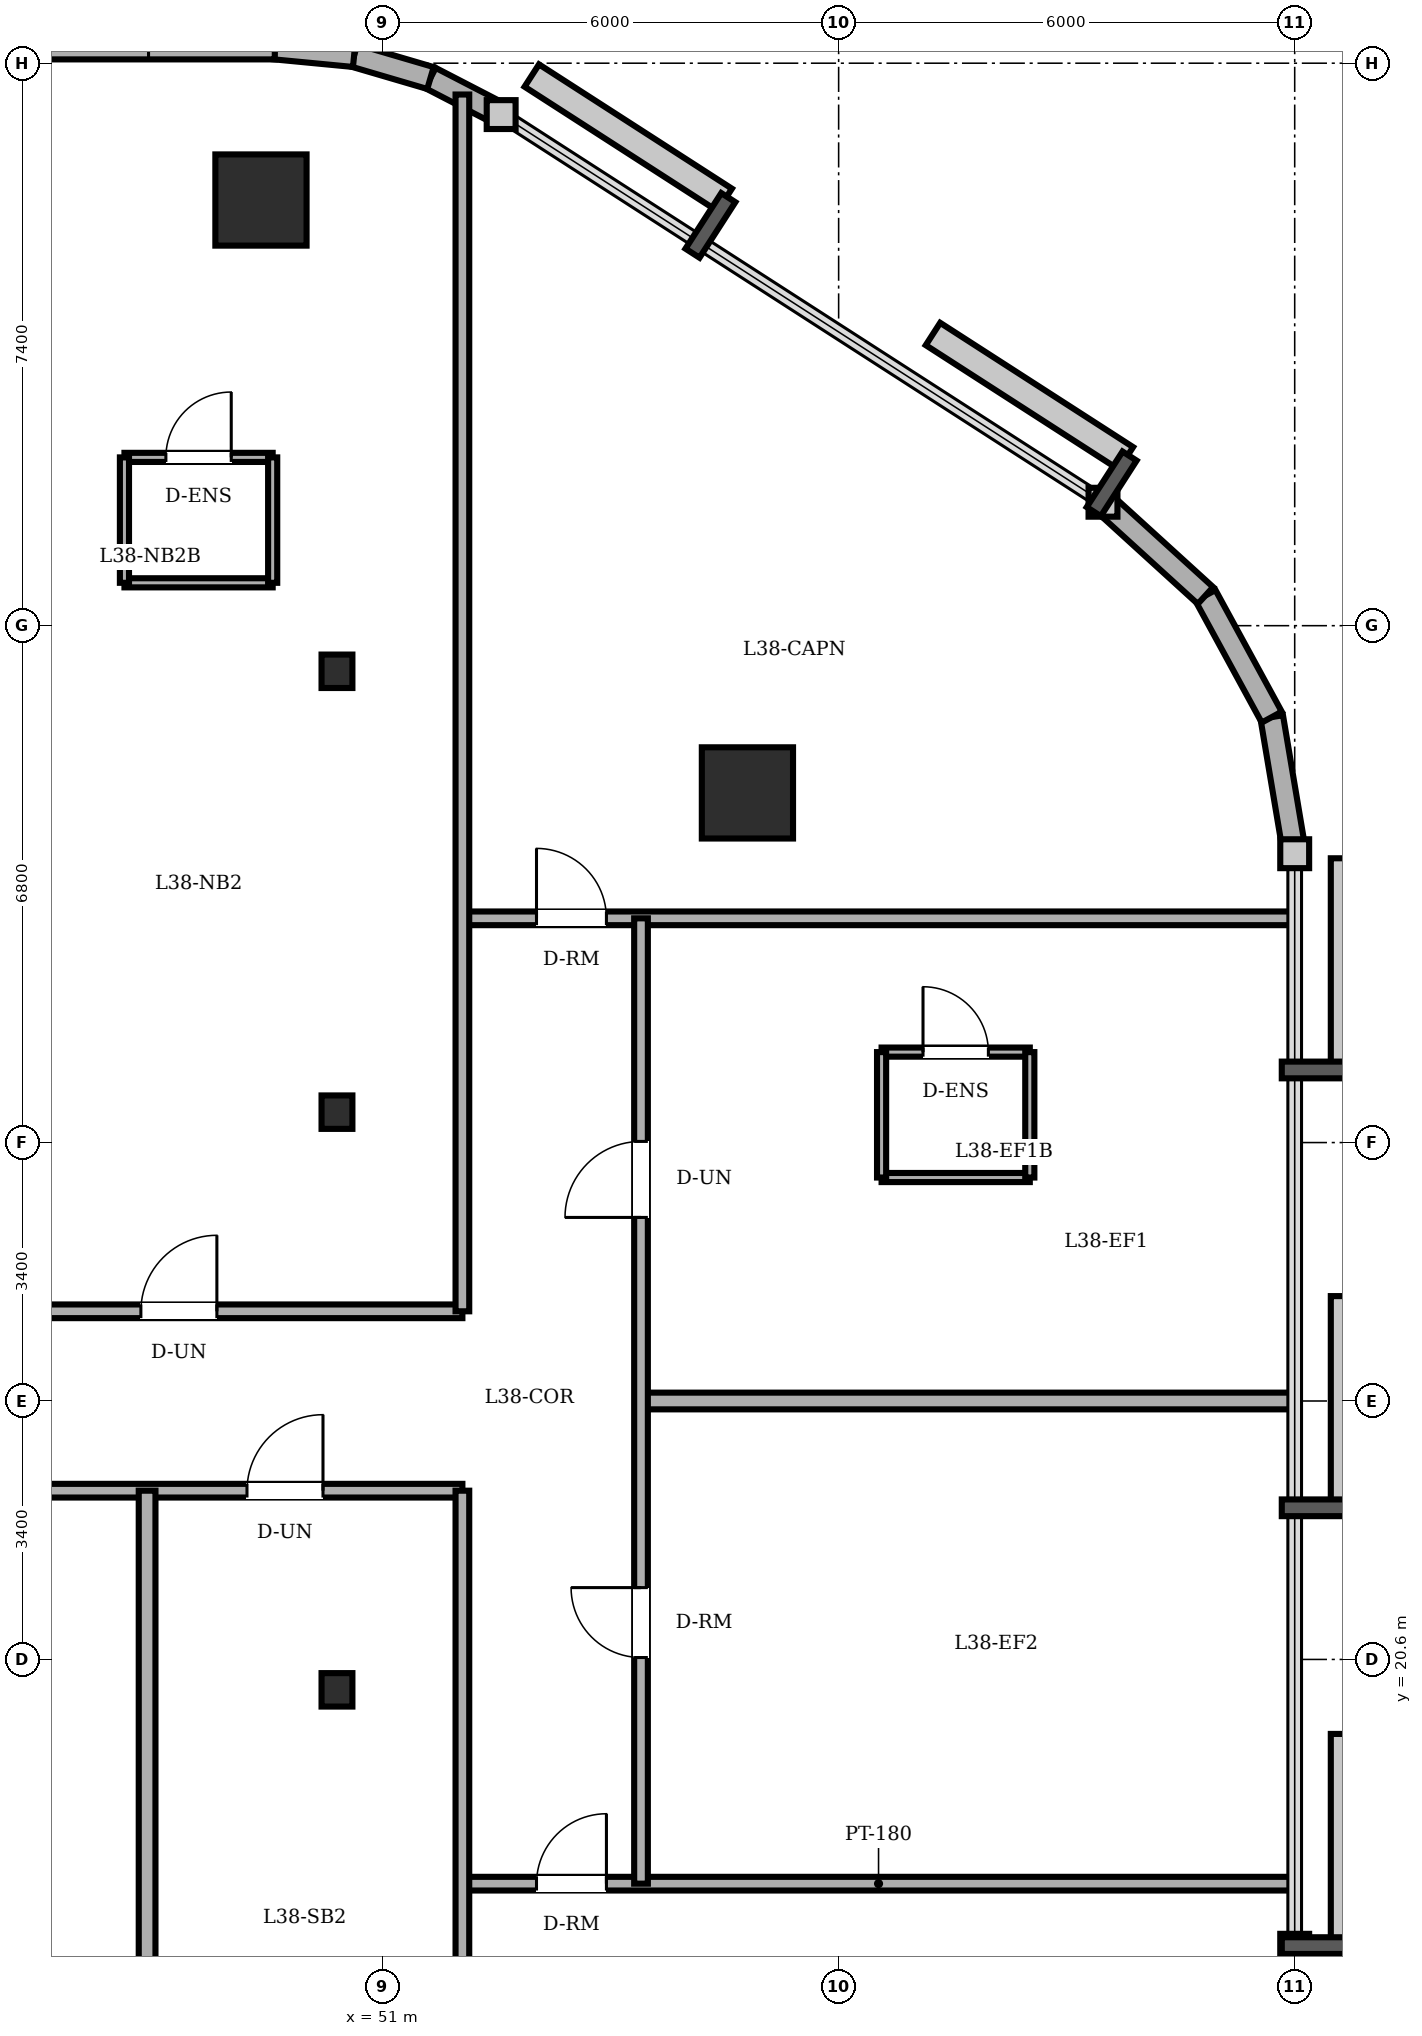
"""IFC4 building model, lengths in metres.
Left out: names, types, materials, properties, quantities, classifications, styles, units other than length and angle.
Written with IfcOpenShell. Run it as: python <this file> out.ifc"""

import sys

from ifc_helpers import new_model, si_unit, direction, frame, frame_2d, origin, origin_2d, place, context, subcontext, project, spatial, rectangle, circle, i_section, extrude, element, fill, save


model = new_model("IFC4")
c1 = context("Model", 3, precision=1e-05, world=origin(), true_north=direction((0.0, 1.0)))
c2 = subcontext(c1, "Body", "Model", "MODEL_VIEW")
j1 = project(units=[si_unit("LENGTHUNIT", "METRE"), si_unit("PLANEANGLEUNIT", "RADIAN")], contexts=[c1])
p1 = place(None, origin())
s1 = spatial("IfcSite", under=j1, at=p1, CompositionType="ELEMENT")
p2 = place(p1, origin())
s2 = spatial("IfcBuilding", under=s1, at=p2, CompositionType="ELEMENT")
p3 = place(p2, frame((0.0, 0.0, 147.4)))
s3 = spatial("IfcBuildingStorey", under=s2, at=p3, CompositionType="ELEMENT", Elevation=147.4)
for number, where, z_axis, x_axis in (
    (1, (55.8, 32.0, 0.0), (0.0, 0.0, 1.0), (1.0, 0.0, 0.0)),
    (2, (49.4, 39.8, 0.0), (0.0, 0.0, 1.0), (1.0, 0.0, 0.0)),
):
    element("IfcColumn", number, at=place(p3, frame(where, z_axis=z_axis, x_axis=x_axis)), inside=s3, PredefinedType="COLUMN", context=c2, shape_type="SweptSolid", body=[
        extrude(circle(Radius=0.6, at=origin_2d()), origin(), (0.0, 0.0, 1.0), 3.6),
    ])
for number, where, z_axis, x_axis in (
    (3, (50.4, 20.2, 0.0), (0.0, 0.0, 1.0), (1.0, 0.0, 0.0)),
    (4, (50.4, 27.8, 0.0), (0.0, 0.0, 1.0), (1.0, 0.0, 0.0)),
    (5, (50.4, 33.6, 0.0), (0.0, 0.0, 1.0), (1.0, 0.0, 0.0)),
):
    element("IfcColumn", number, at=place(p3, frame(where, z_axis=z_axis, x_axis=x_axis)), inside=s3, PredefinedType="COLUMN", context=c2, shape_type="SweptSolid", body=[
        extrude(i_section(OverallWidth=0.406, OverallDepth=0.44, WebThickness=0.024, FlangeThickness=0.039, FilletRadius=0.015, at=origin_2d()), origin(), (0.0, 0.0, 1.0), 3.6),
    ])
for number, where, z_axis, x_axis in (
    (6, (62.698, 15.003, 0.0), (0.0, 0.0, 1.0), (0.166, 0.986, 0.0)),
    (7, (63.0, 31.2, 0.0), (0.0, 0.0, 1.0), (-0.166, 0.986, 0.0)),
):
    element("IfcWall", number, at=place(p3, frame(where, z_axis=z_axis, x_axis=x_axis)), inside=s3, PredefinedType="SOLIDWALL", context=c2, shape_type="SweptSolid", body=[
        extrude(rectangle(XDim=1.822, YDim=0.3, at=frame_2d((0.911, 0.0))), origin(), (0.0, 0.0, 1.0), 3.4),
    ])
p4 = place(p3, frame((62.698, 32.997, 0.0), z_axis=(0.0, 0.0, 1.0), x_axis=(-0.478608030646, 0.878028674362, 0.0)))
e8 = element("IfcWall", 8, at=p4, inside=s3, PredefinedType="SOLIDWALL", context=c2, shape_type="SweptSolid", body=[
    extrude(rectangle(XDim=1.822, YDim=0.3, at=frame_2d((0.911, 0.0))), origin(), (0.0, 0.0, 1.0), 3.4),
])
p5 = place(p3, frame((61.826, 34.597, 0.0), z_axis=(0.0, 0.0, 1.0), x_axis=(-0.73947929393, 0.673179302897, 0.0)))
e9 = element("IfcWall", 9, at=p5, inside=s3, PredefinedType="SOLIDWALL", context=c2, shape_type="SweptSolid", body=[
    extrude(rectangle(XDim=1.823, YDim=0.3, at=frame_2d((0.911, 0.0))), origin(), (0.0, 0.0, 1.0), 3.4),
])
p6 = place(p3, frame((52.56, 40.924, 0.0), z_axis=(0.0, 0.0, 1.0), x_axis=(-0.888283247196, 0.459296062198, 0.0)))
e10 = element("IfcWall", 10, at=p6, inside=s3, PredefinedType="SOLIDWALL", context=c2, shape_type="SweptSolid", body=[
    extrude(rectangle(XDim=1.047, YDim=0.3, at=frame_2d((0.523, 0.0))), origin(), (0.0, 0.0, 1.0), 3.4),
])
p7 = place(p3, frame((51.63, 41.405, 0.0), z_axis=(0.0, 0.0, 1.0), x_axis=(-0.959528674476, 0.281610942363, 0.0)))
e11 = element("IfcWall", 11, at=p7, inside=s3, PredefinedType="SOLIDWALL", context=c2, shape_type="SweptSolid", body=[
    extrude(rectangle(XDim=1.047, YDim=0.3, at=frame_2d((0.524, 0.0))), origin(), (0.0, 0.0, 1.0), 3.4),
])
p8 = place(p3, frame((50.625, 41.7, 0.0), z_axis=(0.0, 0.0, 1.0), x_axis=(-0.995426089968, 0.095534807324, 0.0)))
e12 = element("IfcWall", 12, at=p8, inside=s3, PredefinedType="SOLIDWALL", context=c2, shape_type="SweptSolid", body=[
    extrude(rectangle(XDim=1.048, YDim=0.3, at=frame_2d((0.524, 0.0))), origin(), (0.0, 0.0, 1.0), 3.4),
])
p9 = place(p3, frame((49.582, 41.8, 0.0), z_axis=(0.0, 0.0, 1.0), x_axis=(-1.0, 0.0, 0.0)))
e13 = element("IfcWall", 13, at=p9, inside=s3, PredefinedType="SOLIDWALL", context=c2, shape_type="SweptSolid", body=[
    extrude(rectangle(XDim=30.282, YDim=0.3, at=frame_2d((15.141, 0.0))), origin(), (0.0, 0.0, 1.0), 3.4),
])
p10 = place(p9, frame((25.707, 0.0, 0.0)))
e14 = element("IfcOpeningElement", 14, at=p10, cuts=e13, PredefinedType="OPENING", context=c2, shape_type="SweptSolid", body=[
    extrude(rectangle(XDim=0.95, YDim=2.2, at=frame_2d((0.475, 1.1))), frame((0.0, 0.16, 0.0), z_axis=(0.0, -1.0, 0.0), x_axis=(1.0, 0.0, 0.0)), (0.0, 0.0, 1.0), 0.32),
])
p11 = place(p9, frame((1.661, 0.0, 0.85)))
e15 = element("IfcOpeningElement", 15, at=p11, cuts=e13, PredefinedType="OPENING", context=c2, shape_type="SweptSolid", body=[
    extrude(rectangle(XDim=1.5, YDim=1.55, at=frame_2d((0.75, 0.775))), frame((0.0, 0.16, 0.0), z_axis=(0.0, -1.0, 0.0), x_axis=(1.0, 0.0, 0.0)), (0.0, 0.0, 1.0), 0.32),
])
p12 = place(p9, frame((5.476, 0.0, 0.85)))
e16 = element("IfcOpeningElement", 16, at=p12, cuts=e13, PredefinedType="OPENING", context=c2, shape_type="SweptSolid", body=[
    extrude(rectangle(XDim=1.5, YDim=1.55, at=frame_2d((0.75, 0.775))), frame((0.0, 0.16, 0.0), z_axis=(0.0, -1.0, 0.0), x_axis=(1.0, 0.0, 0.0)), (0.0, 0.0, 1.0), 0.32),
])
p13 = place(p9, frame((7.229, 0.0, 0.85)))
e17 = element("IfcOpeningElement", 17, at=p13, cuts=e13, PredefinedType="OPENING", context=c2, shape_type="SweptSolid", body=[
    extrude(rectangle(XDim=1.5, YDim=1.55, at=frame_2d((0.75, 0.775))), frame((0.0, 0.16, 0.0), z_axis=(0.0, -1.0, 0.0), x_axis=(1.0, 0.0, 0.0)), (0.0, 0.0, 1.0), 0.32),
])
p14 = place(p9, frame((11.665, 0.0, 0.85)))
e18 = element("IfcOpeningElement", 18, at=p14, cuts=e13, PredefinedType="OPENING", context=c2, shape_type="SweptSolid", body=[
    extrude(rectangle(XDim=1.5, YDim=1.55, at=frame_2d((0.75, 0.775))), frame((0.0, 0.16, 0.0), z_axis=(0.0, -1.0, 0.0), x_axis=(1.0, 0.0, 0.0)), (0.0, 0.0, 1.0), 0.32),
])
p15 = place(p9, frame((14.349, 0.0, 0.85)))
e19 = element("IfcOpeningElement", 19, at=p15, cuts=e13, PredefinedType="OPENING", context=c2, shape_type="SweptSolid", body=[
    extrude(rectangle(XDim=1.5, YDim=1.55, at=frame_2d((0.75, 0.775))), frame((0.0, 0.16, 0.0), z_axis=(0.0, -1.0, 0.0), x_axis=(1.0, 0.0, 0.0)), (0.0, 0.0, 1.0), 0.32),
])
p16 = place(p9, frame((18.932, 0.0, 0.85)))
e20 = element("IfcOpeningElement", 20, at=p16, cuts=e13, PredefinedType="OPENING", context=c2, shape_type="SweptSolid", body=[
    extrude(rectangle(XDim=1.5, YDim=1.55, at=frame_2d((0.75, 0.775))), frame((0.0, 0.16, 0.0), z_axis=(0.0, -1.0, 0.0), x_axis=(1.0, 0.0, 0.0)), (0.0, 0.0, 1.0), 0.32),
])
p17 = place(p9, frame((22.532, 0.0, 0.85)))
e21 = element("IfcOpeningElement", 21, at=p17, cuts=e13, PredefinedType="OPENING", context=c2, shape_type="SweptSolid", body=[
    extrude(rectangle(XDim=1.5, YDim=1.55, at=frame_2d((0.75, 0.775))), frame((0.0, 0.16, 0.0), z_axis=(0.0, -1.0, 0.0), x_axis=(1.0, 0.0, 0.0)), (0.0, 0.0, 1.0), 0.32),
])
p18 = place(p9, frame((27.532, 0.0, 0.85)))
e22 = element("IfcOpeningElement", 22, at=p18, cuts=e13, PredefinedType="OPENING", context=c2, shape_type="SweptSolid", body=[
    extrude(rectangle(XDim=1.5, YDim=1.55, at=frame_2d((0.75, 0.775))), frame((0.0, 0.16, 0.0), z_axis=(0.0, -1.0, 0.0), x_axis=(1.0, 0.0, 0.0)), (0.0, 0.0, 1.0), 0.32),
])
p19 = place(p3, frame((47.604, 36.414, 0.0), z_axis=(0.0, 0.0, 1.0), x_axis=(1.0, 0.0, 0.0)))
e23 = element("IfcWall", 23, at=p19, inside=s3, PredefinedType="PARTITIONING", context=c2, shape_type="SweptSolid", body=[
    extrude(rectangle(XDim=1.95, YDim=0.12, at=frame_2d((0.975, 0.0))), origin(), (0.0, 0.0, 1.0), 3.4),
])
p20 = place(p19, frame((0.545, 0.0, 0.0)))
e24 = element("IfcOpeningElement", 24, at=p20, cuts=e23, PredefinedType="OPENING", context=c2, shape_type="SweptSolid", body=[
    extrude(rectangle(XDim=0.86, YDim=2.1, at=frame_2d((0.43, 1.05))), frame((0.0, 0.07, 0.0), z_axis=(0.0, -1.0, 0.0), x_axis=(1.0, 0.0, 0.0)), (0.0, 0.0, 1.0), 0.14),
])
p21 = place(p3, frame((49.554, 34.764, 0.0), z_axis=(0.0, 0.0, 1.0), x_axis=(-1.0, 0.0, 0.0)))
e25 = element("IfcWall", 25, at=p21, inside=s3, PredefinedType="PARTITIONING", context=c2, shape_type="SweptSolid", body=[
    extrude(rectangle(XDim=1.95, YDim=0.12, at=frame_2d((0.975, 0.0))), origin(), (0.0, 0.0, 1.0), 3.4),
])
for number, where, z_axis, x_axis in (
    (26, (47.604, 36.414, 0.0), (0.0, 0.0, 1.0), (0.0, -1.0, 0.0)),
    (27, (49.554, 34.764, 0.0), (0.0, 0.0, 1.0), (0.0, 1.0, 0.0)),
):
    element("IfcWall", number, at=place(p3, frame(where, z_axis=z_axis, x_axis=x_axis)), inside=s3, PredefinedType="PARTITIONING", context=c2, shape_type="SweptSolid", body=[
        extrude(rectangle(XDim=1.65, YDim=0.12, at=frame_2d((0.825, 0.0))), origin(), (0.0, 0.0, 1.0), 3.4),
    ])
p22 = place(p3, frame((57.565, 28.59, 0.0), z_axis=(0.0, 0.0, 1.0), x_axis=(1.0, 0.0, 0.0)))
e28 = element("IfcWall", 28, at=p22, inside=s3, PredefinedType="PARTITIONING", context=c2, shape_type="SweptSolid", body=[
    extrude(rectangle(XDim=1.95, YDim=0.12, at=frame_2d((0.975, 0.0))), origin(), (0.0, 0.0, 1.0), 3.4),
])
p23 = place(p22, frame((0.545, 0.0, 0.0)))
e29 = element("IfcOpeningElement", 29, at=p23, cuts=e28, PredefinedType="OPENING", context=c2, shape_type="SweptSolid", body=[
    extrude(rectangle(XDim=0.86, YDim=2.1, at=frame_2d((0.43, 1.05))), frame((0.0, 0.07, 0.0), z_axis=(0.0, -1.0, 0.0), x_axis=(1.0, 0.0, 0.0)), (0.0, 0.0, 1.0), 0.14),
])
p24 = place(p3, frame((59.515, 26.94, 0.0), z_axis=(0.0, 0.0, 1.0), x_axis=(-1.0, 0.0, 0.0)))
e30 = element("IfcWall", 30, at=p24, inside=s3, PredefinedType="PARTITIONING", context=c2, shape_type="SweptSolid", body=[
    extrude(rectangle(XDim=1.95, YDim=0.12, at=frame_2d((0.975, 0.0))), origin(), (0.0, 0.0, 1.0), 3.4),
])
for number, where, z_axis, x_axis in (
    (31, (57.565, 28.59, 0.0), (0.0, 0.0, 1.0), (0.0, -1.0, 0.0)),
    (32, (59.515, 26.94, 0.0), (0.0, 0.0, 1.0), (0.0, 1.0, 0.0)),
):
    element("IfcWall", number, at=place(p3, frame(where, z_axis=z_axis, x_axis=x_axis)), inside=s3, PredefinedType="PARTITIONING", context=c2, shape_type="SweptSolid", body=[
        extrude(rectangle(XDim=1.65, YDim=0.12, at=frame_2d((0.825, 0.0))), origin(), (0.0, 0.0, 1.0), 3.4),
    ])
p25 = place(p3, frame((52.05, 17.65, 0.0), z_axis=(0.0, 0.0, 1.0), x_axis=(1.0, 0.0, 0.0)))
e33 = element("IfcWall", 33, at=p25, inside=s3, PredefinedType="PARTITIONING", context=c2, shape_type="SweptSolid", body=[
    extrude(rectangle(XDim=10.95, YDim=0.18, at=frame_2d((5.475, 0.0))), origin(), (0.0, 0.0, 1.0), 3.4),
])
p26 = place(p25, frame((0.975, 0.0, 0.0)))
e34 = element("IfcOpeningElement", 34, at=p26, cuts=e33, PredefinedType="OPENING", context=c2, shape_type="SweptSolid", body=[
    extrude(rectangle(XDim=0.92, YDim=2.1, at=frame_2d((0.46, 1.05))), frame((0.0, 0.1, 0.0), z_axis=(0.0, -1.0, 0.0), x_axis=(1.0, 0.0, 0.0)), (0.0, 0.0, 1.0), 0.2),
])
p27 = place(p3, frame((39.85, 22.82, 0.0), z_axis=(0.0, 0.0, 1.0), x_axis=(1.0, 0.0, 0.0)))
e35 = element("IfcWall", 35, at=p27, inside=s3, PredefinedType="PARTITIONING", context=c2, shape_type="SweptSolid", body=[
    extrude(rectangle(XDim=12.2, YDim=0.18, at=frame_2d((6.1, 0.0))), origin(), (0.0, 0.0, 1.0), 3.4),
])
p28 = place(p27, frame((9.366, 0.0, 0.0)))
e36 = element("IfcOpeningElement", 36, at=p28, cuts=e35, PredefinedType="OPENING", context=c2, shape_type="SweptSolid", body=[
    extrude(rectangle(XDim=1.0, YDim=2.15, at=frame_2d((0.5, 1.075))), frame((0.0, 0.1, 0.0), z_axis=(0.0, -1.0, 0.0), x_axis=(1.0, 0.0, 0.0)), (0.0, 0.0, 1.0), 0.2),
])
p29 = place(p3, frame((54.4, 24.0, 0.0), z_axis=(0.0, 0.0, 1.0), x_axis=(1.0, 0.0, 0.0)))
e37 = element("IfcWall", 37, at=p29, inside=s3, PredefinedType="PARTITIONING", context=c2, shape_type="SweptSolid", body=[
    extrude(rectangle(XDim=8.6, YDim=0.22, at=frame_2d((4.3, 0.0))), origin(), (0.0, 0.0, 1.0), 3.182),
])
p30 = place(p3, frame((39.85, 25.18, 0.0), z_axis=(0.0, 0.0, 1.0), x_axis=(1.0, 0.0, 0.0)))
e38 = element("IfcWall", 38, at=p30, inside=s3, PredefinedType="PARTITIONING", context=c2, shape_type="SweptSolid", body=[
    extrude(rectangle(XDim=12.2, YDim=0.18, at=frame_2d((6.1, 0.0))), origin(), (0.0, 0.0, 1.0), 3.4),
])
p31 = place(p30, frame((7.97, 0.0, 0.0)))
e39 = element("IfcOpeningElement", 39, at=p31, cuts=e38, PredefinedType="OPENING", context=c2, shape_type="SweptSolid", body=[
    extrude(rectangle(XDim=1.0, YDim=2.15, at=frame_2d((0.5, 1.075))), frame((0.0, 0.1, 0.0), z_axis=(0.0, -1.0, 0.0), x_axis=(1.0, 0.0, 0.0)), (0.0, 0.0, 1.0), 0.2),
])
p32 = place(p3, frame((52.05, 30.35, 0.0), z_axis=(0.0, 0.0, 1.0), x_axis=(1.0, 0.0, 0.0)))
e40 = element("IfcWall", 40, at=p32, inside=s3, PredefinedType="PARTITIONING", context=c2, shape_type="SweptSolid", body=[
    extrude(rectangle(XDim=10.95, YDim=0.18, at=frame_2d((5.475, 0.0))), origin(), (0.0, 0.0, 1.0), 3.4),
])
p33 = place(p32, frame((0.975, 0.0, 0.0)))
e41 = element("IfcOpeningElement", 41, at=p33, cuts=e40, PredefinedType="OPENING", context=c2, shape_type="SweptSolid", body=[
    extrude(rectangle(XDim=0.92, YDim=2.1, at=frame_2d((0.46, 1.05))), frame((0.0, 0.1, 0.0), z_axis=(0.0, -1.0, 0.0), x_axis=(1.0, 0.0, 0.0)), (0.0, 0.0, 1.0), 0.2),
])
p34 = place(p3, frame((47.902, 6.2, 0.0), z_axis=(0.0, 0.0, 1.0), x_axis=(0.0, 1.0, 0.0)))
e42 = element("IfcWall", 42, at=p34, inside=s3, PredefinedType="PARTITIONING", context=c2, shape_type="SweptSolid", body=[
    extrude(rectangle(XDim=16.62, YDim=0.22, at=frame_2d((8.31, 0.0))), origin(), (0.0, 0.0, 1.0), 3.4),
])
for number, where, z_axis, x_axis in (
    (43, (52.05, 6.812, 0.0), (0.0, 0.0, 1.0), (0.0, 1.0, 0.0)),
    (44, (52.05, 25.18, 0.0), (0.0, 0.0, 1.0), (0.0, 1.0, 0.0)),
):
    element("IfcWall", number, at=place(p3, frame(where, z_axis=z_axis, x_axis=x_axis)), inside=s3, PredefinedType="PARTITIONING", context=c2, shape_type="SweptSolid", body=[
        extrude(rectangle(XDim=16.008, YDim=0.18, at=frame_2d((8.004, 0.0))), origin(), (0.0, 0.0, 1.0), 3.4),
    ])
p35 = place(p3, frame((54.4, 17.65, 0.0), z_axis=(0.0, 0.0, 1.0), x_axis=(0.0, 1.0, 0.0)))
e45 = element("IfcWall", 45, at=p35, inside=s3, PredefinedType="PARTITIONING", context=c2, shape_type="SweptSolid", body=[
    extrude(rectangle(XDim=12.7, YDim=0.18, at=frame_2d((6.35, 0.0))), origin(), (0.0, 0.0, 1.0), 3.4),
])
p36 = place(p35, frame((8.765, 0.0, 0.0)))
e46 = element("IfcOpeningElement", 46, at=p36, cuts=e45, PredefinedType="OPENING", context=c2, shape_type="SweptSolid", body=[
    extrude(rectangle(XDim=1.0, YDim=2.15, at=frame_2d((0.5, 1.075))), frame((0.0, 0.1, 0.0), z_axis=(0.0, -1.0, 0.0), x_axis=(1.0, 0.0, 0.0)), (0.0, 0.0, 1.0), 0.2),
])
p37 = place(p35, frame((2.975, 0.0, 0.0)))
e47 = element("IfcOpeningElement", 47, at=p37, cuts=e45, PredefinedType="OPENING", context=c2, shape_type="SweptSolid", body=[
    extrude(rectangle(XDim=0.92, YDim=2.1, at=frame_2d((0.46, 1.05))), frame((0.0, 0.1, 0.0), z_axis=(0.0, -1.0, 0.0), x_axis=(1.0, 0.0, 0.0)), (0.0, 0.0, 1.0), 0.2),
])
p38 = place(p20, origin())
e48 = element("IfcDoor", 48, at=p38, inside=s3, OperationType="SINGLE_SWING_RIGHT", PredefinedType="DOOR", context=c2, shape_type="SweptSolid", body=[
    extrude(rectangle(XDim=0.86, YDim=2.1, at=frame_2d((0.43, 1.05))), frame((0.0, 0.025, 0.0), z_axis=(0.0, -1.0, 0.0), x_axis=(1.0, 0.0, 0.0)), (0.0, 0.0, 1.0), 0.05),
])
fill(e24, e48)
p39 = place(p23, origin())
e49 = element("IfcDoor", 49, at=p39, inside=s3, OperationType="SINGLE_SWING_LEFT", PredefinedType="DOOR", context=c2, shape_type="SweptSolid", body=[
    extrude(rectangle(XDim=0.86, YDim=2.1, at=frame_2d((0.43, 1.05))), frame((0.0, 0.025, 0.0), z_axis=(0.0, -1.0, 0.0), x_axis=(1.0, 0.0, 0.0)), (0.0, 0.0, 1.0), 0.05),
])
fill(e29, e49)
p40 = place(p31, origin())
e50 = element("IfcDoor", 50, at=p40, inside=s3, OperationType="SINGLE_SWING_RIGHT", PredefinedType="DOOR", context=c2, shape_type="SweptSolid", body=[
    extrude(rectangle(XDim=1.0, YDim=2.15, at=frame_2d((0.5, 1.075))), frame((0.0, 0.025, 0.0), z_axis=(0.0, -1.0, 0.0), x_axis=(1.0, 0.0, 0.0)), (0.0, 0.0, 1.0), 0.05),
])
fill(e39, e50)
p41 = place(p28, origin())
e51 = element("IfcDoor", 51, at=p41, inside=s3, OperationType="SINGLE_SWING_RIGHT", PredefinedType="DOOR", context=c2, shape_type="SweptSolid", body=[
    extrude(rectangle(XDim=1.0, YDim=2.15, at=frame_2d((0.5, 1.075))), frame((0.0, 0.025, 0.0), z_axis=(0.0, -1.0, 0.0), x_axis=(1.0, 0.0, 0.0)), (0.0, 0.0, 1.0), 0.05),
])
fill(e36, e51)
p42 = place(p33, origin())
e52 = element("IfcDoor", 52, at=p42, inside=s3, OperationType="SINGLE_SWING_LEFT", PredefinedType="DOOR", context=c2, shape_type="SweptSolid", body=[
    extrude(rectangle(XDim=0.92, YDim=2.1, at=frame_2d((0.46, 1.05))), frame((0.0, 0.025, 0.0), z_axis=(0.0, -1.0, 0.0), x_axis=(1.0, 0.0, 0.0)), (0.0, 0.0, 1.0), 0.05),
])
fill(e41, e52)
p43 = place(p26, origin())
e53 = element("IfcDoor", 53, at=p43, inside=s3, OperationType="SINGLE_SWING_RIGHT", PredefinedType="DOOR", context=c2, shape_type="SweptSolid", body=[
    extrude(rectangle(XDim=0.92, YDim=2.1, at=frame_2d((0.46, 1.05))), frame((0.0, 0.025, 0.0), z_axis=(0.0, -1.0, 0.0), x_axis=(1.0, 0.0, 0.0)), (0.0, 0.0, 1.0), 0.05),
])
fill(e34, e53)
p44 = place(p36, origin())
e54 = element("IfcDoor", 54, at=p44, inside=s3, OperationType="SINGLE_SWING_LEFT", PredefinedType="DOOR", context=c2, shape_type="SweptSolid", body=[
    extrude(rectangle(XDim=1.0, YDim=2.15, at=frame_2d((0.5, 1.075))), frame((0.0, 0.025, 0.0), z_axis=(0.0, -1.0, 0.0), x_axis=(1.0, 0.0, 0.0)), (0.0, 0.0, 1.0), 0.05),
])
fill(e46, e54)
p45 = place(p37, origin())
e55 = element("IfcDoor", 55, at=p45, inside=s3, OperationType="SINGLE_SWING_RIGHT", PredefinedType="DOOR", context=c2, shape_type="SweptSolid", body=[
    extrude(rectangle(XDim=0.92, YDim=2.1, at=frame_2d((0.46, 1.05))), frame((0.0, 0.025, 0.0), z_axis=(0.0, -1.0, 0.0), x_axis=(1.0, 0.0, 0.0)), (0.0, 0.0, 1.0), 0.05),
])
fill(e47, e55)
save(model, sys.argv[1])
